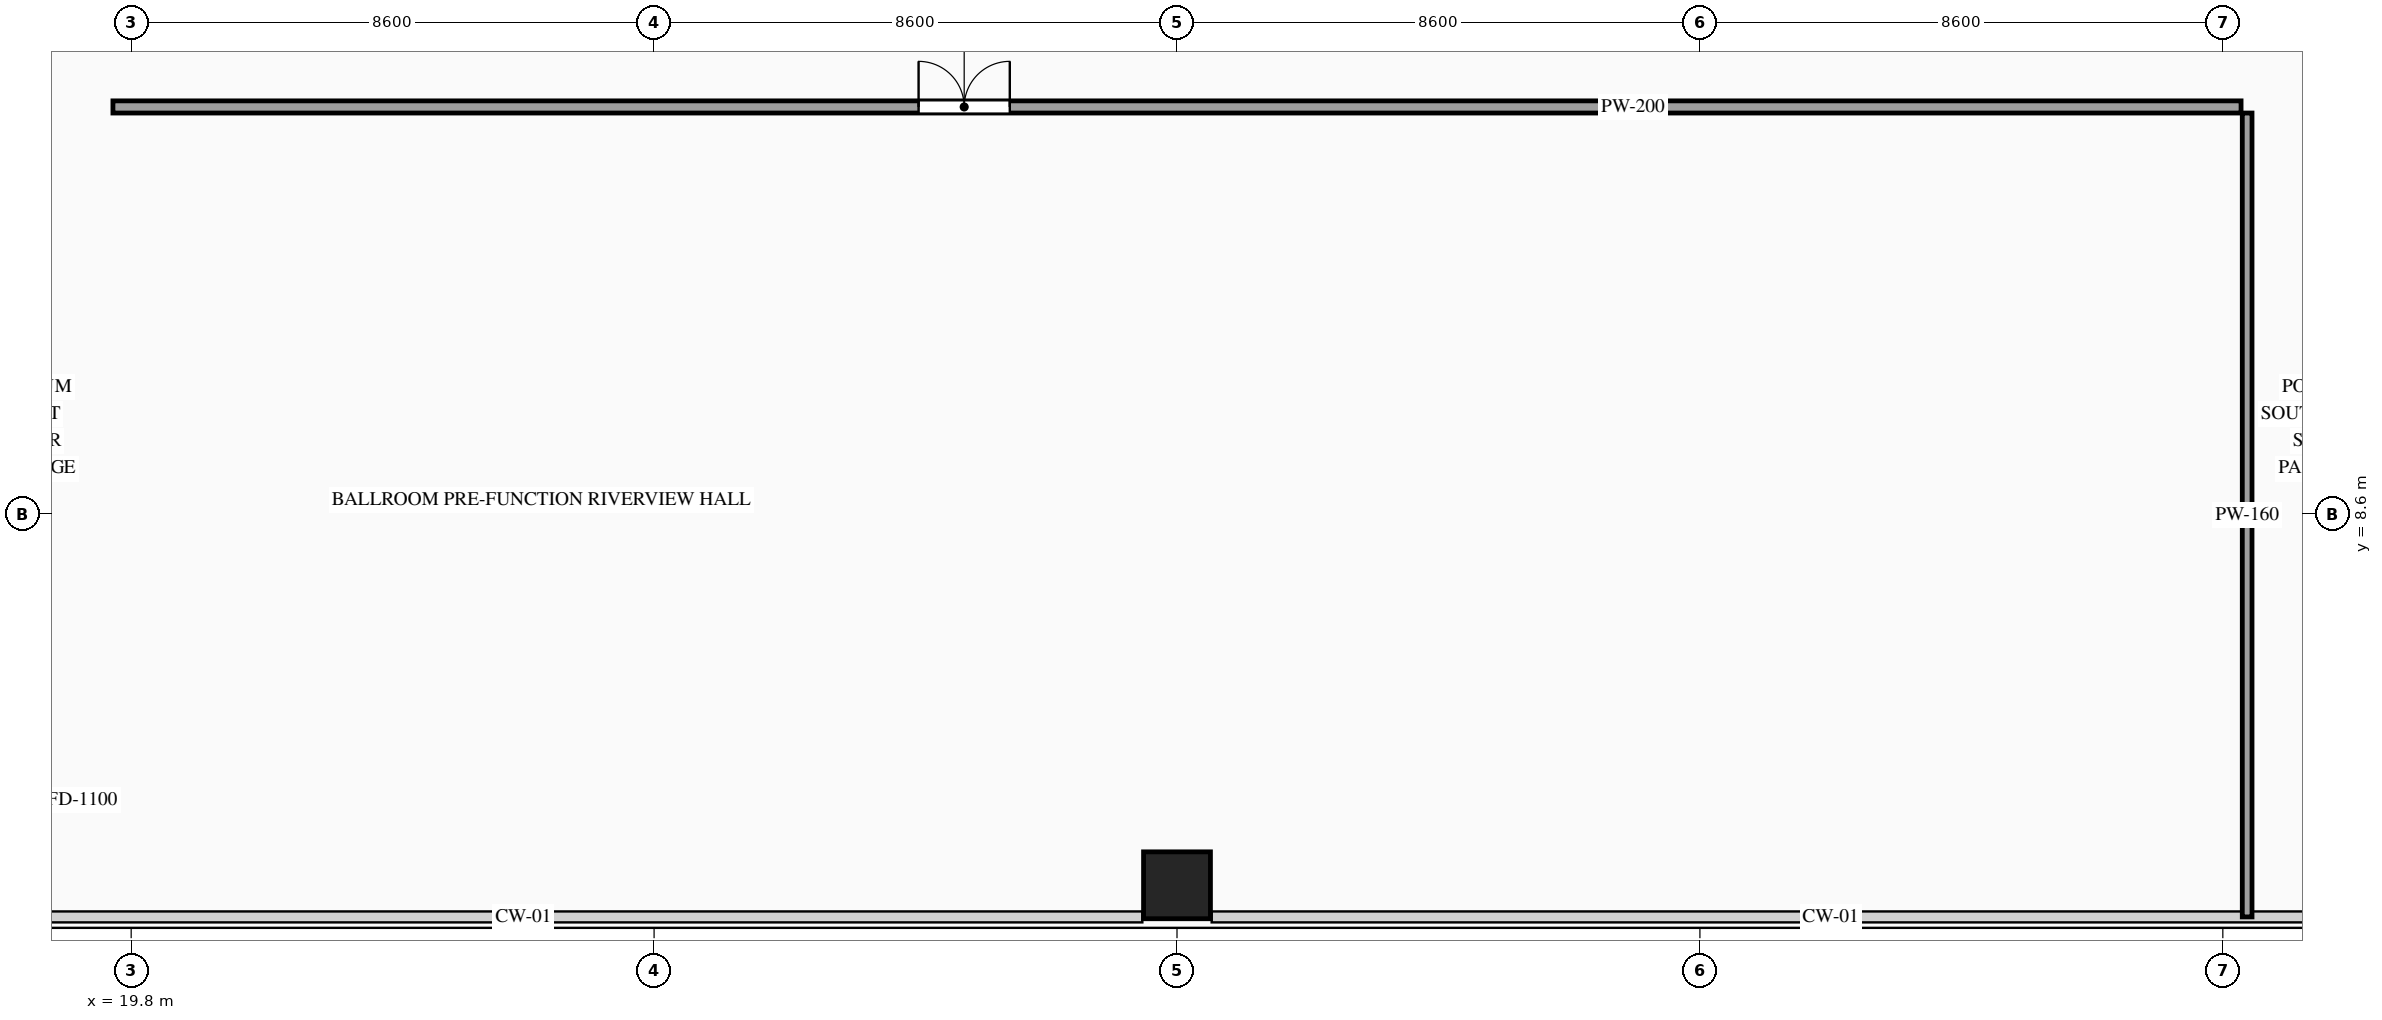
"""IFC4 building model, lengths in metres.
Left out: names, types, materials, properties, quantities, classifications, styles, units other than length and angle.
Written with IfcOpenShell. Run it as: python <this file> out.ifc"""

import sys

from ifc_helpers import new_model, si_unit, direction, frame, frame_2d, origin, origin_2d, place, context, subcontext, project, spatial, rectangle, extrude, source, transform, mapped, element, fill, save


model = new_model("IFC4")
c1 = context("Model", 3, precision=1e-05, world=origin(), true_north=direction((0.0, 1.0)))
c2 = subcontext(c1, "Body", "Model", "MODEL_VIEW")
j1 = project(units=[si_unit("LENGTHUNIT", "METRE"), si_unit("PLANEANGLEUNIT", "RADIAN")], contexts=[c1])
p1 = place(None, origin())
s1 = spatial("IfcSite", under=j1, at=p1, CompositionType="ELEMENT")
p2 = place(p1, origin())
s2 = spatial("IfcBuilding", under=s1, at=p2, CompositionType="ELEMENT")
p3 = place(p2, frame((0.0, 0.0, 19.8)))
s3 = spatial("IfcBuildingStorey", under=s2, at=p3, CompositionType="ELEMENT", Elevation=19.8)
m1 = source(origin(), c2, "Body", "SweptSolid", [
    extrude(rectangle(XDim=1.1, YDim=1.1, at=origin_2d()), origin(), (0.0, 0.0, 1.0), 6.0),
])
p4 = place(p3, frame((37.0, 2.5, 0.0), z_axis=(0.0, 0.0, 1.0), x_axis=(1.0, 0.0, 0.0)))
e1 = element("IfcColumn", 1, at=p4, inside=s3, PredefinedType="COLUMN", context=c2, shape_type="MappedRepresentation", body=[
    mapped(m1, transform((0.0, 0.0, 0.0), scale=1.0)),
])
p5 = place(p3, frame((19.5, 15.3, 0.0), z_axis=(0.0, 0.0, 1.0), x_axis=(1.0, 0.0, 0.0)))
e2 = element("IfcWall", 2, at=p5, inside=s3, PredefinedType="PARTITIONING", context=c2, shape_type="SweptSolid", body=[
    extrude(rectangle(XDim=35.0, YDim=0.2, at=frame_2d((17.5, 0.0))), origin(), (0.0, 0.0, 1.0), 5.68),
])
p6 = place(p5, frame((13.25, 0.0, 0.0)))
e3 = element("IfcOpeningElement", 3, at=p6, cuts=e2, PredefinedType="OPENING", context=c2, shape_type="SweptSolid", body=[
    extrude(rectangle(XDim=1.5, YDim=2.3, at=frame_2d((0.75, 1.15))), frame((0.0, 0.115, 0.0), z_axis=(0.0, -1.0, 0.0), x_axis=(1.0, 0.0, 0.0)), (0.0, 0.0, 1.0), 0.23),
])
m2 = source(origin(), c2, "Body", "SweptSolid", [
    extrude(rectangle(XDim=13.22, YDim=0.16, at=frame_2d((6.61, 0.0))), origin(), (0.0, 0.0, 1.0), 5.68),
])
p7 = place(p3, frame((54.6, 1.98, 0.0), z_axis=(0.0, 0.0, 1.0), x_axis=(0.0, 1.0, 0.0)))
e4 = element("IfcWall", 4, at=p7, inside=s3, PredefinedType="PARTITIONING", context=c2, shape_type="MappedRepresentation", body=[
    mapped(m2, transform((0.0, 0.0, 0.0), scale=1.0)),
])
m3 = source(origin(), c2, "Body", "SweptSolid", [
    extrude(rectangle(XDim=1.5, YDim=2.3, at=frame_2d((0.75, 1.15))), frame((0.0, 0.025, 0.0), z_axis=(0.0, -1.0, 0.0), x_axis=(1.0, 0.0, 0.0)), (0.0, 0.0, 1.0), 0.05),
])
p8 = place(p6, origin())
e5 = element("IfcDoor", 5, at=p8, inside=s3, OperationType="DOUBLE_DOOR_SINGLE_SWING", PredefinedType="DOOR", context=c2, shape_type="MappedRepresentation", body=[
    mapped(m3, transform((0.0, 0.0, 0.0), scale=1.0)),
])
fill(e3, e5)
save(model, sys.argv[1])
